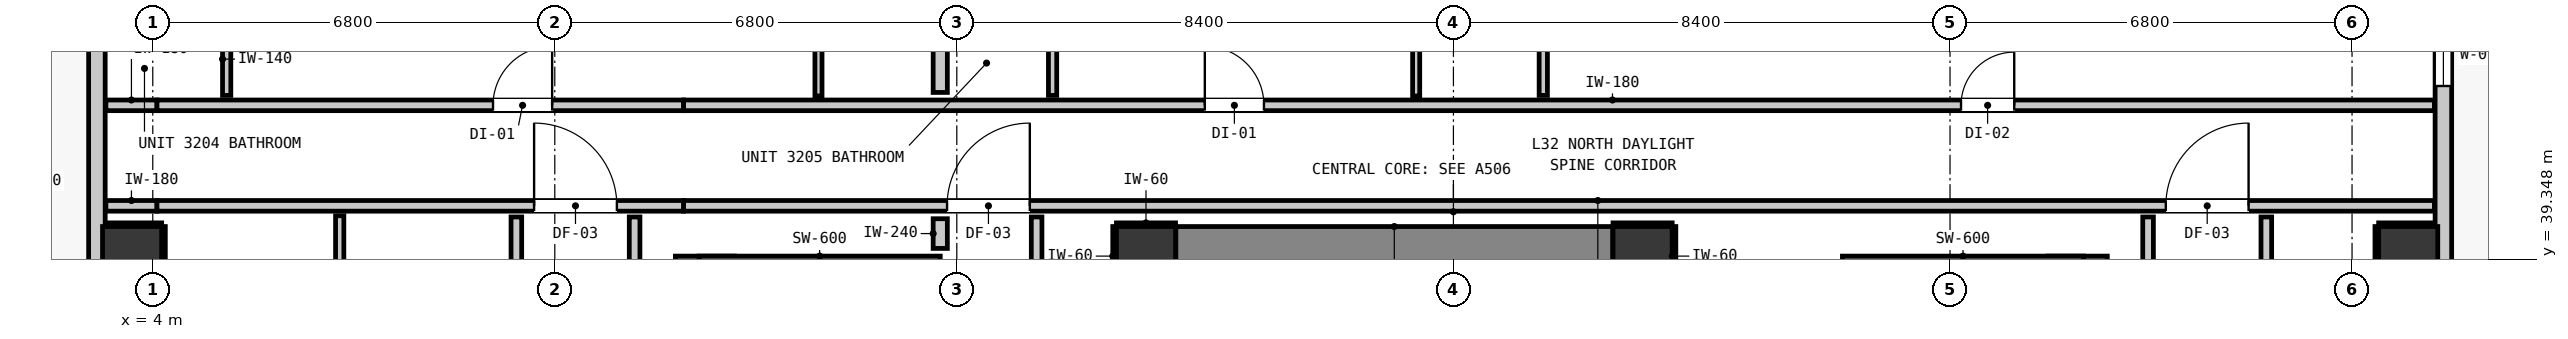
"""IFC4 building model, lengths in metres.
Left out: names, types, materials, properties, quantities, classifications, styles, units other than length and angle.
Written with IfcOpenShell. Run it as: python <this file> out.ifc"""

import sys

from ifc_helpers import new_model, si_unit, direction, frame, frame_2d, origin, origin_2d, place, context, subcontext, project, spatial, rectangle, extrude, element, fill, save


model = new_model("IFC4")
c1 = context("Model", 3, precision=1e-05, world=origin(), true_north=direction((0.0, 1.0)))
c2 = subcontext(c1, "Body", "Model", "MODEL_VIEW")
j1 = project(units=[si_unit("LENGTHUNIT", "METRE"), si_unit("PLANEANGLEUNIT", "RADIAN")], contexts=[c1])
p1 = place(None, origin())
s1 = spatial("IfcSite", under=j1, at=p1, CompositionType="ELEMENT")
p2 = place(p1, origin())
s2 = spatial("IfcBuilding", under=s1, at=p2, CompositionType="ELEMENT")
p3 = place(p2, frame((0.0, 0.0, 112.72)))
s3 = spatial("IfcBuildingStorey", under=s2, at=p3, CompositionType="ELEMENT", Elevation=112.72)
for number, where, z_axis, x_axis in (
    (1, (20.8, 39.4, 0.0), (0.0, 0.0, 1.0), (1.0, 0.0, 0.0)),
    (2, (29.2, 39.4, 0.0), (0.0, 0.0, 1.0), (1.0, 0.0, 0.0)),
):
    element("IfcColumn", number, at=place(p3, frame(where, z_axis=z_axis, x_axis=x_axis)), inside=s3, PredefinedType="COLUMN", context=c2, shape_type="SweptSolid", body=[
        extrude(rectangle(XDim=1.0, YDim=1.0, at=origin_2d()), origin(), (0.0, 0.0, 1.0), 3.32),
    ])
p4 = place(p3, frame((13.34, 31.205, 0.0), z_axis=(0.0, 0.0, 1.0), x_axis=(0.0, 1.0, 0.0)))
e3 = element("IfcWall", 3, at=p4, inside=s3, PredefinedType="SHEAR", context=c2, shape_type="SweptSolid", body=[
    extrude(rectangle(XDim=8.195, YDim=1.0, at=frame_2d((4.097, 0.0))), origin(), (0.0, 0.0, 1.0), 3.32),
])
p5 = place(p3, frame((13.24, 39.1, 0.0), z_axis=(0.0, 0.0, 1.0), x_axis=(1.0, 0.0, 0.0)))
e4 = element("IfcWall", 4, at=p5, inside=s3, PredefinedType="SHEAR", context=c2, shape_type="SweptSolid", body=[
    extrude(rectangle(XDim=4.08, YDim=0.6, at=frame_2d((2.04, 0.0))), origin(), (0.0, 0.0, 1.0), 3.32),
])
p6 = place(p3, frame((36.56, 31.205, 0.0), z_axis=(0.0, 0.0, 1.0), x_axis=(0.0, 1.0, 0.0)))
e5 = element("IfcWall", 5, at=p6, inside=s3, PredefinedType="SHEAR", context=c2, shape_type="SweptSolid", body=[
    extrude(rectangle(XDim=8.195, YDim=1.0, at=frame_2d((4.097, 0.0))), origin(), (0.0, 0.0, 1.0), 3.32),
])
p7 = place(p3, frame((32.58, 39.1, 0.0), z_axis=(0.0, 0.0, 1.0), x_axis=(1.0, 0.0, 0.0)))
e6 = element("IfcWall", 6, at=p7, inside=s3, PredefinedType="SHEAR", context=c2, shape_type="SweptSolid", body=[
    extrude(rectangle(XDim=4.08, YDim=0.6, at=frame_2d((2.04, 0.0))), origin(), (0.0, 0.0, 1.0), 3.32),
])
p8 = place(p3, frame((21.305, 39.4, 0.0), z_axis=(0.0, 0.0, 1.0), x_axis=(1.0, 0.0, 0.0)))
e7 = element("IfcWall", 7, at=p8, inside=s3, PredefinedType="SHEAR", context=c2, shape_type="SweptSolid", body=[
    extrude(rectangle(XDim=7.39, YDim=1.0, at=frame_2d((3.695, 0.0))), origin(), (0.0, 0.0, 1.0), 3.32),
])
for number, where, z_axis, x_axis in (
    (8, (3.65, 39.4, 0.0), (0.0, 0.0, 1.0), (1.0, 0.0, 0.0)),
    (9, (42.15, 39.4, 0.0), (0.0, 0.0, 1.0), (1.0, 0.0, 0.0)),
):
    element("IfcColumn", number, at=place(p3, frame(where, z_axis=z_axis, x_axis=x_axis)), inside=s3, PredefinedType="COLUMN", context=c2, shape_type="SweptSolid", body=[
        extrude(rectangle(XDim=1.0, YDim=1.0, at=origin_2d()), origin(), (0.0, 0.0, 1.0), 3.32),
    ])
p9 = place(p3, frame((3.055, 11.355, 0.0), z_axis=(0.0, 0.0, 1.0), x_axis=(0.0, 1.0, 0.0)))
e10 = element("IfcWall", 10, at=p9, inside=s3, PredefinedType="STANDARD", context=c2, shape_type="SweptSolid", body=[
    extrude(rectangle(XDim=32.29, YDim=0.28, at=frame_2d((16.145, 0.0))), origin(), (0.0, 0.0, 1.0), 3.08),
])
p10 = place(p9, frame((5.818, 0.0, 0.0)))
e11 = element("IfcOpeningElement", 11, at=p10, cuts=e10, PredefinedType="OPENING", context=c2, shape_type="SweptSolid", body=[
    extrude(rectangle(XDim=1.0, YDim=2.15, at=frame_2d((0.5, 1.075))), frame((0.0, 0.15, 0.0), z_axis=(0.0, -1.0, 0.0), x_axis=(1.0, 0.0, 0.0)), (0.0, 0.0, 1.0), 0.3),
])
p11 = place(p9, frame((0.395, 0.0, 0.85)))
e12 = element("IfcOpeningElement", 12, at=p11, cuts=e10, PredefinedType="OPENING", context=c2, shape_type="SweptSolid", body=[
    extrude(rectangle(XDim=1.35, YDim=1.85, at=frame_2d((0.675, 0.925))), frame((0.0, 0.15, 0.0), z_axis=(0.0, -1.0, 0.0), x_axis=(1.0, 0.0, 0.0)), (0.0, 0.0, 1.0), 0.3),
])
p12 = place(p9, frame((20.78, 0.0, 0.85)))
e13 = element("IfcOpeningElement", 13, at=p12, cuts=e10, PredefinedType="OPENING", context=c2, shape_type="SweptSolid", body=[
    extrude(rectangle(XDim=1.35, YDim=1.85, at=frame_2d((0.675, 0.925))), frame((0.0, 0.15, 0.0), z_axis=(0.0, -1.0, 0.0), x_axis=(1.0, 0.0, 0.0)), (0.0, 0.0, 1.0), 0.3),
])
p13 = place(p9, frame((12.61, 0.0, 0.85)))
e14 = element("IfcOpeningElement", 14, at=p13, cuts=e10, PredefinedType="OPENING", context=c2, shape_type="SweptSolid", body=[
    extrude(rectangle(XDim=1.35, YDim=1.85, at=frame_2d((0.675, 0.925))), frame((0.0, 0.15, 0.0), z_axis=(0.0, -1.0, 0.0), x_axis=(1.0, 0.0, 0.0)), (0.0, 0.0, 1.0), 0.3),
])
p14 = place(p9, frame((24.73, 0.0, 0.85)))
e15 = element("IfcOpeningElement", 15, at=p14, cuts=e10, PredefinedType="OPENING", context=c2, shape_type="SweptSolid", body=[
    extrude(rectangle(XDim=1.35, YDim=1.85, at=frame_2d((0.675, 0.925))), frame((0.0, 0.15, 0.0), z_axis=(0.0, -1.0, 0.0), x_axis=(1.0, 0.0, 0.0)), (0.0, 0.0, 1.0), 0.3),
])
p15 = place(p3, frame((42.745, 43.645, 0.0), z_axis=(0.0, 0.0, 1.0), x_axis=(0.0, -1.0, 0.0)))
e16 = element("IfcWall", 16, at=p15, inside=s3, PredefinedType="STANDARD", context=c2, shape_type="SweptSolid", body=[
    extrude(rectangle(XDim=32.29, YDim=0.28, at=frame_2d((16.145, 0.0))), origin(), (0.0, 0.0, 1.0), 3.08),
])
p16 = place(p15, frame((5.467, 0.0, 0.0)))
e17 = element("IfcOpeningElement", 17, at=p16, cuts=e16, PredefinedType="OPENING", context=c2, shape_type="SweptSolid", body=[
    extrude(rectangle(XDim=1.0, YDim=2.15, at=frame_2d((0.5, 1.075))), frame((0.0, 0.15, 0.0), z_axis=(0.0, -1.0, 0.0), x_axis=(1.0, 0.0, 0.0)), (0.0, 0.0, 1.0), 0.3),
])
p17 = place(p15, frame((0.318, 0.0, 0.85)))
e18 = element("IfcOpeningElement", 18, at=p17, cuts=e16, PredefinedType="OPENING", context=c2, shape_type="SweptSolid", body=[
    extrude(rectangle(XDim=1.05, YDim=1.65, at=frame_2d((0.525, 0.825))), frame((0.0, 0.15, 0.0), z_axis=(0.0, -1.0, 0.0), x_axis=(1.0, 0.0, 0.0)), (0.0, 0.0, 1.0), 0.3),
])
p18 = place(p15, frame((14.648, 0.0, 0.85)))
e19 = element("IfcOpeningElement", 19, at=p18, cuts=e16, PredefinedType="OPENING", context=c2, shape_type="SweptSolid", body=[
    extrude(rectangle(XDim=1.35, YDim=1.85, at=frame_2d((0.675, 0.925))), frame((0.0, 0.15, 0.0), z_axis=(0.0, -1.0, 0.0), x_axis=(1.0, 0.0, 0.0)), (0.0, 0.0, 1.0), 0.3),
])
p19 = place(p3, frame((3.207, 40.25, 0.0), z_axis=(0.0, 0.0, 1.0), x_axis=(1.0, 0.0, 0.0)))
e20 = element("IfcWall", 20, at=p19, inside=s3, PredefinedType="PARTITIONING", context=c2, shape_type="SweptSolid", body=[
    extrude(rectangle(XDim=0.864, YDim=0.18, at=frame_2d((0.432, 0.0))), origin(), (0.0, 0.0, 1.0), 3.08),
])
p20 = place(p3, frame((4.071, 40.25, 0.0), z_axis=(0.0, 0.0, 1.0), x_axis=(1.0, 0.0, 0.0)))
e21 = element("IfcWall", 21, at=p20, inside=s3, PredefinedType="PARTITIONING", context=c2, shape_type="SweptSolid", body=[
    extrude(rectangle(XDim=8.908, YDim=0.18, at=frame_2d((4.454, 0.0))), origin(), (0.0, 0.0, 1.0), 2.565),
])
p21 = place(p20, frame((6.379, 0.0, 0.0)))
e22 = element("IfcOpeningElement", 22, at=p21, cuts=e21, PredefinedType="OPENING", context=c2, shape_type="SweptSolid", body=[
    extrude(rectangle(XDim=1.4, YDim=2.15, at=frame_2d((0.7, 1.075))), frame((0.0, 0.1, 0.0), z_axis=(0.0, -1.0, 0.0), x_axis=(1.0, 0.0, 0.0)), (0.0, 0.0, 1.0), 0.2),
])
p22 = place(p3, frame((12.979, 40.25, 0.0), z_axis=(0.0, 0.0, 1.0), x_axis=(1.0, 0.0, 0.0)))
e23 = element("IfcWall", 23, at=p22, inside=s3, PredefinedType="PARTITIONING", context=c2, shape_type="SweptSolid", body=[
    extrude(rectangle(XDim=29.614, YDim=0.18, at=frame_2d((14.807, 0.0))), origin(), (0.0, 0.0, 1.0), 3.08),
])
p23 = place(p22, frame((4.456, 0.0, 0.0)))
e24 = element("IfcOpeningElement", 24, at=p23, cuts=e23, PredefinedType="OPENING", context=c2, shape_type="SweptSolid", body=[
    extrude(rectangle(XDim=1.4, YDim=2.15, at=frame_2d((0.7, 1.075))), frame((0.0, 0.1, 0.0), z_axis=(0.0, -1.0, 0.0), x_axis=(1.0, 0.0, 0.0)), (0.0, 0.0, 1.0), 0.2),
])
p24 = place(p22, frame((25.071, 0.0, 0.0)))
e25 = element("IfcOpeningElement", 25, at=p24, cuts=e23, PredefinedType="OPENING", context=c2, shape_type="SweptSolid", body=[
    extrude(rectangle(XDim=1.4, YDim=2.15, at=frame_2d((0.7, 1.075))), frame((0.0, 0.1, 0.0), z_axis=(0.0, -1.0, 0.0), x_axis=(1.0, 0.0, 0.0)), (0.0, 0.0, 1.0), 0.2),
])
p25 = place(p3, frame((3.207, 41.95, 0.0), z_axis=(0.0, 0.0, 1.0), x_axis=(1.0, 0.0, 0.0)))
e26 = element("IfcWall", 26, at=p25, inside=s3, PredefinedType="PARTITIONING", context=c2, shape_type="SweptSolid", body=[
    extrude(rectangle(XDim=0.864, YDim=0.18, at=frame_2d((0.432, 0.0))), origin(), (0.0, 0.0, 1.0), 3.08),
])
p26 = place(p3, frame((4.071, 41.95, 0.0), z_axis=(0.0, 0.0, 1.0), x_axis=(1.0, 0.0, 0.0)))
e27 = element("IfcWall", 27, at=p26, inside=s3, PredefinedType="PARTITIONING", context=c2, shape_type="SweptSolid", body=[
    extrude(rectangle(XDim=8.908, YDim=0.18, at=frame_2d((4.454, 0.0))), origin(), (0.0, 0.0, 1.0), 2.565),
])
p27 = place(p26, frame((5.684, 0.0, 0.0)))
e28 = element("IfcOpeningElement", 28, at=p27, cuts=e27, PredefinedType="OPENING", context=c2, shape_type="SweptSolid", body=[
    extrude(rectangle(XDim=1.0, YDim=2.15, at=frame_2d((0.5, 1.075))), frame((0.0, 0.1, 0.0), z_axis=(0.0, -1.0, 0.0), x_axis=(1.0, 0.0, 0.0)), (0.0, 0.0, 1.0), 0.2),
])
p28 = place(p3, frame((12.979, 41.95, 0.0), z_axis=(0.0, 0.0, 1.0), x_axis=(1.0, 0.0, 0.0)))
e29 = element("IfcWall", 29, at=p28, inside=s3, PredefinedType="PARTITIONING", context=c2, shape_type="SweptSolid", body=[
    extrude(rectangle(XDim=29.614, YDim=0.18, at=frame_2d((14.807, 0.0))), origin(), (0.0, 0.0, 1.0), 3.08),
])
p29 = place(p28, frame((8.816, 0.0, 0.0)))
e30 = element("IfcOpeningElement", 30, at=p29, cuts=e29, PredefinedType="OPENING", context=c2, shape_type="SweptSolid", body=[
    extrude(rectangle(XDim=1.0, YDim=2.15, at=frame_2d((0.5, 1.075))), frame((0.0, 0.1, 0.0), z_axis=(0.0, -1.0, 0.0), x_axis=(1.0, 0.0, 0.0)), (0.0, 0.0, 1.0), 0.2),
])
p30 = place(p28, frame((21.607, 0.0, 0.0)))
e31 = element("IfcOpeningElement", 31, at=p30, cuts=e29, PredefinedType="OPENING", context=c2, shape_type="SweptSolid", body=[
    extrude(rectangle(XDim=0.9, YDim=2.1, at=frame_2d((0.45, 1.05))), frame((0.0, 0.1, 0.0), z_axis=(0.0, -1.0, 0.0), x_axis=(1.0, 0.0, 0.0)), (0.0, 0.0, 1.0), 0.2),
])
p31 = place(p3, frame((17.32, 39.53, 0.0), z_axis=(0.0, 0.0, 1.0), x_axis=(0.0, 1.0, 0.0)))
e32 = element("IfcWall", 32, at=p31, inside=s3, PredefinedType="PARTITIONING", context=c2, shape_type="SweptSolid", body=[
    extrude(rectangle(XDim=0.502, YDim=0.24, at=frame_2d((0.251, 0.0))), origin(), (0.0, 0.0, 1.0), 3.08),
])
p32 = place(p3, frame((17.32, 42.168, 0.0), z_axis=(0.0, 0.0, 1.0), x_axis=(0.0, 1.0, 0.0)))
e33 = element("IfcWall", 33, at=p32, inside=s3, PredefinedType="PARTITIONING", context=c2, shape_type="SweptSolid", body=[
    extrude(rectangle(XDim=3.625, YDim=0.24, at=frame_2d((1.812, 0.0))), origin(), (0.0, 0.0, 1.0), 3.08),
])
p33 = place(p3, frame((10.15, 34.688, 0.0), z_axis=(0.0, 0.0, 1.0), x_axis=(0.0, 1.0, 0.0)))
e34 = element("IfcWall", 34, at=p33, inside=s3, PredefinedType="PARTITIONING", context=c2, shape_type="SweptSolid", body=[
    extrude(rectangle(XDim=5.374, YDim=0.18, at=frame_2d((2.687, 0.0))), origin(), (0.0, 0.0, 1.0), 3.08),
])
p34 = place(p3, frame((12.15, 21.368, 0.0), z_axis=(0.0, 0.0, 1.0), x_axis=(0.0, 1.0, 0.0)))
e35 = element("IfcWall", 35, at=p34, inside=s3, PredefinedType="PARTITIONING", context=c2, shape_type="SweptSolid", body=[
    extrude(rectangle(XDim=18.694, YDim=0.18, at=frame_2d((9.347, 0.0))), origin(), (0.0, 0.0, 1.0), 3.08),
])
p35 = place(p3, frame((18.95, 39.058, 0.0), z_axis=(0.0, 0.0, 1.0), x_axis=(0.0, 1.0, 0.0)))
e36 = element("IfcWall", 36, at=p35, inside=s3, PredefinedType="PARTITIONING", context=c2, shape_type="SweptSolid", body=[
    extrude(rectangle(XDim=1.004, YDim=0.18, at=frame_2d((0.502, 0.0))), origin(), (0.0, 0.0, 1.0), 3.08),
])
p36 = place(p3, frame((37.75, 21.368, 0.0), z_axis=(0.0, 0.0, 1.0), x_axis=(0.0, 1.0, 0.0)))
e37 = element("IfcWall", 37, at=p36, inside=s3, PredefinedType="PARTITIONING", context=c2, shape_type="SweptSolid", body=[
    extrude(rectangle(XDim=18.694, YDim=0.18, at=frame_2d((9.347, 0.0))), origin(), (0.0, 0.0, 1.0), 3.08),
])
p37 = place(p3, frame((39.75, 35.05, 0.0), z_axis=(0.0, 0.0, 1.0), x_axis=(0.0, 1.0, 0.0)))
e38 = element("IfcWall", 38, at=p37, inside=s3, PredefinedType="PARTITIONING", context=c2, shape_type="SweptSolid", body=[
    extrude(rectangle(XDim=5.012, YDim=0.18, at=frame_2d((2.506, 0.0))), origin(), (0.0, 0.0, 1.0), 3.08),
])
p38 = place(p3, frame((5.25, 42.118, 0.0), z_axis=(0.0, 0.0, 1.0), x_axis=(0.0, 1.0, 0.0)))
e39 = element("IfcWall", 39, at=p38, inside=s3, PredefinedType="PARTITIONING", context=c2, shape_type="SweptSolid", body=[
    extrude(rectangle(XDim=3.507, YDim=0.14, at=frame_2d((1.753, 0.0))), origin(), (0.0, 0.0, 1.0), 3.08),
])
p39 = place(p38, frame((1.327, 0.0, 0.0)))
e40 = element("IfcOpeningElement", 40, at=p39, cuts=e39, PredefinedType="OPENING", context=c2, shape_type="SweptSolid", body=[
    extrude(rectangle(XDim=0.86, YDim=2.02, at=frame_2d((0.43, 1.01))), frame((0.0, 0.08, 0.0), z_axis=(0.0, -1.0, 0.0), x_axis=(1.0, 0.0, 0.0)), (0.0, 0.0, 1.0), 0.16),
])
p40 = place(p3, frame((7.162, 34.668, 0.0), z_axis=(0.0, 0.0, 1.0), x_axis=(0.0, 1.0, 0.0)))
e41 = element("IfcWall", 41, at=p40, inside=s3, PredefinedType="PARTITIONING", context=c2, shape_type="SweptSolid", body=[
    extrude(rectangle(XDim=5.414, YDim=0.14, at=frame_2d((2.707, 0.0))), origin(), (0.0, 0.0, 1.0), 3.08),
])
p41 = place(p3, frame((19.22, 42.118, 0.0), z_axis=(0.0, 0.0, 1.0), x_axis=(0.0, 1.0, 0.0)))
e42 = element("IfcWall", 42, at=p41, inside=s3, PredefinedType="PARTITIONING", context=c2, shape_type="SweptSolid", body=[
    extrude(rectangle(XDim=3.675, YDim=0.14, at=frame_2d((1.837, 0.0))), origin(), (0.0, 0.0, 1.0), 3.08),
])
p42 = place(p41, frame((1.327, 0.0, 0.0)))
e43 = element("IfcOpeningElement", 43, at=p42, cuts=e42, PredefinedType="OPENING", context=c2, shape_type="SweptSolid", body=[
    extrude(rectangle(XDim=0.86, YDim=2.02, at=frame_2d((0.43, 1.01))), frame((0.0, 0.08, 0.0), z_axis=(0.0, -1.0, 0.0), x_axis=(1.0, 0.0, 0.0)), (0.0, 0.0, 1.0), 0.16),
])
p43 = place(p3, frame((27.52, 42.118, 0.0), z_axis=(0.0, 0.0, 1.0), x_axis=(0.0, 1.0, 0.0)))
e44 = element("IfcWall", 44, at=p43, inside=s3, PredefinedType="PARTITIONING", context=c2, shape_type="SweptSolid", body=[
    extrude(rectangle(XDim=3.675, YDim=0.14, at=frame_2d((1.837, 0.0))), origin(), (0.0, 0.0, 1.0), 3.08),
])
p44 = place(p3, frame((15.26, 42.108, 0.0), z_axis=(0.0, 0.0, 1.0), x_axis=(0.0, 1.0, 0.0)))
e45 = element("IfcWall", 45, at=p44, inside=s3, PredefinedType="PARTITIONING", context=c2, shape_type="SweptSolid", body=[
    extrude(rectangle(XDim=3.685, YDim=0.12, at=frame_2d((1.843, 0.0))), origin(), (0.0, 0.0, 1.0), 3.08),
])
p45 = place(p44, frame((1.317, 0.0, 0.0)))
e46 = element("IfcOpeningElement", 46, at=p45, cuts=e45, PredefinedType="OPENING", context=c2, shape_type="SweptSolid", body=[
    extrude(rectangle(XDim=0.9, YDim=2.1, at=frame_2d((0.45, 1.05))), frame((0.0, 0.07, 0.0), z_axis=(0.0, -1.0, 0.0), x_axis=(1.0, 0.0, 0.0)), (0.0, 0.0, 1.0), 0.14),
])
p46 = place(p3, frame((25.37, 42.108, 0.0), z_axis=(0.0, 0.0, 1.0), x_axis=(0.0, 1.0, 0.0)))
e47 = element("IfcWall", 47, at=p46, inside=s3, PredefinedType="PARTITIONING", context=c2, shape_type="SweptSolid", body=[
    extrude(rectangle(XDim=3.685, YDim=0.12, at=frame_2d((1.843, 0.0))), origin(), (0.0, 0.0, 1.0), 3.08),
])
p47 = place(p46, frame((1.317, 0.0, 0.0)))
e48 = element("IfcOpeningElement", 48, at=p47, cuts=e47, PredefinedType="OPENING", context=c2, shape_type="SweptSolid", body=[
    extrude(rectangle(XDim=0.9, YDim=2.1, at=frame_2d((0.45, 1.05))), frame((0.0, 0.07, 0.0), z_axis=(0.0, -1.0, 0.0), x_axis=(1.0, 0.0, 0.0)), (0.0, 0.0, 1.0), 0.14),
])
for number, where, z_axis, x_axis in (
    (49, (20.3, 39.932, 0.0), (0.0, 0.0, 1.0), (1.0, 0.0, 0.0)),
    (50, (20.268, 38.9, 0.0), (0.0, 0.0, 1.0), (0.0, 1.0, 0.0)),
    (51, (28.7, 39.932, 0.0), (0.0, 0.0, 1.0), (1.0, 0.0, 0.0)),
    (52, (29.732, 38.9, 0.0), (0.0, 0.0, 1.0), (0.0, 1.0, 0.0)),
):
    element("IfcWall", number, at=place(p3, frame(where, z_axis=z_axis, x_axis=x_axis)), inside=s3, PredefinedType="PARTITIONING", context=c2, shape_type="SweptSolid", body=[
        extrude(rectangle(XDim=1.0, YDim=0.06, at=frame_2d((0.5, 0.0))), origin(), (0.0, 0.0, 1.0), 1.45),
    ])
p48 = place(p3, frame((3.21, 39.932, 0.0), z_axis=(0.0, 0.0, 1.0), x_axis=(1.0, 0.0, 0.0)))
e53 = element("IfcWall", 53, at=p48, inside=s3, PredefinedType="PARTITIONING", context=c2, shape_type="SweptSolid", body=[
    extrude(rectangle(XDim=0.94, YDim=0.06, at=frame_2d((0.47, 0.0))), origin(), (0.0, 0.0, 1.0), 1.45),
])
p49 = place(p3, frame((4.182, 38.9, 0.0), z_axis=(0.0, 0.0, 1.0), x_axis=(0.0, 1.0, 0.0)))
e54 = element("IfcWall", 54, at=p49, inside=s3, PredefinedType="PARTITIONING", context=c2, shape_type="SweptSolid", body=[
    extrude(rectangle(XDim=1.0, YDim=0.06, at=frame_2d((0.5, 0.0))), origin(), (0.0, 0.0, 1.0), 1.45),
])
p50 = place(p3, frame((41.65, 39.932, 0.0), z_axis=(0.0, 0.0, 1.0), x_axis=(1.0, 0.0, 0.0)))
e55 = element("IfcWall", 55, at=p50, inside=s3, PredefinedType="PARTITIONING", context=c2, shape_type="SweptSolid", body=[
    extrude(rectangle(XDim=0.94, YDim=0.06, at=frame_2d((0.47, 0.0))), origin(), (0.0, 0.0, 1.0), 1.45),
])
p51 = place(p3, frame((41.618, 38.9, 0.0), z_axis=(0.0, 0.0, 1.0), x_axis=(0.0, 1.0, 0.0)))
e56 = element("IfcWall", 56, at=p51, inside=s3, PredefinedType="PARTITIONING", context=c2, shape_type="SweptSolid", body=[
    extrude(rectangle(XDim=1.0, YDim=0.06, at=frame_2d((0.5, 0.0))), origin(), (0.0, 0.0, 1.0), 1.45),
])
p52 = place(p17, origin())
e57 = element("IfcWindow", 57, at=p52, inside=s3, PartitioningType="SINGLE_PANEL", PredefinedType="WINDOW", context=c2, shape_type="SweptSolid", body=[
    extrude(rectangle(XDim=1.05, YDim=1.65, at=frame_2d((0.525, 0.825))), frame((0.0, 0.03, 0.0), z_axis=(0.0, -1.0, 0.0), x_axis=(1.0, 0.0, 0.0)), (0.0, 0.0, 1.0), 0.06),
])
fill(e18, e57)
p53 = place(p23, origin())
e58 = element("IfcDoor", 58, at=p53, inside=s3, OperationType="SINGLE_SWING_RIGHT", PredefinedType="DOOR", context=c2, shape_type="SweptSolid", body=[
    extrude(rectangle(XDim=1.4, YDim=2.15, at=frame_2d((0.7, 1.075))), frame((0.0, 0.025, 0.0), z_axis=(0.0, -1.0, 0.0), x_axis=(1.0, 0.0, 0.0)), (0.0, 0.0, 1.0), 0.05),
])
fill(e24, e58)
p54 = place(p21, origin())
e59 = element("IfcDoor", 59, at=p54, inside=s3, OperationType="SINGLE_SWING_LEFT", PredefinedType="DOOR", context=c2, shape_type="SweptSolid", body=[
    extrude(rectangle(XDim=1.4, YDim=2.15, at=frame_2d((0.7, 1.075))), frame((0.0, 0.025, 0.0), z_axis=(0.0, -1.0, 0.0), x_axis=(1.0, 0.0, 0.0)), (0.0, 0.0, 1.0), 0.05),
])
fill(e22, e59)
p55 = place(p24, origin())
e60 = element("IfcDoor", 60, at=p55, inside=s3, OperationType="SINGLE_SWING_RIGHT", PredefinedType="DOOR", context=c2, shape_type="SweptSolid", body=[
    extrude(rectangle(XDim=1.4, YDim=2.15, at=frame_2d((0.7, 1.075))), frame((0.0, 0.025, 0.0), z_axis=(0.0, -1.0, 0.0), x_axis=(1.0, 0.0, 0.0)), (0.0, 0.0, 1.0), 0.05),
])
fill(e25, e60)
p56 = place(p27, origin())
e61 = element("IfcDoor", 61, at=p56, inside=s3, OperationType="SINGLE_SWING_RIGHT", PredefinedType="DOOR", context=c2, shape_type="SweptSolid", body=[
    extrude(rectangle(XDim=1.0, YDim=2.15, at=frame_2d((0.5, 1.075))), frame((0.0, 0.025, 0.0), z_axis=(0.0, -1.0, 0.0), x_axis=(1.0, 0.0, 0.0)), (0.0, 0.0, 1.0), 0.05),
])
fill(e28, e61)
p57 = place(p29, origin())
e62 = element("IfcDoor", 62, at=p57, inside=s3, OperationType="SINGLE_SWING_LEFT", PredefinedType="DOOR", context=c2, shape_type="SweptSolid", body=[
    extrude(rectangle(XDim=1.0, YDim=2.15, at=frame_2d((0.5, 1.075))), frame((0.0, 0.025, 0.0), z_axis=(0.0, -1.0, 0.0), x_axis=(1.0, 0.0, 0.0)), (0.0, 0.0, 1.0), 0.05),
])
fill(e30, e62)
p58 = place(p30, origin())
e63 = element("IfcDoor", 63, at=p58, inside=s3, OperationType="SINGLE_SWING_RIGHT", PredefinedType="DOOR", context=c2, shape_type="SweptSolid", body=[
    extrude(rectangle(XDim=0.9, YDim=2.1, at=frame_2d((0.45, 1.05))), frame((0.0, 0.025, 0.0), z_axis=(0.0, -1.0, 0.0), x_axis=(1.0, 0.0, 0.0)), (0.0, 0.0, 1.0), 0.05),
])
fill(e31, e63)
save(model, sys.argv[1])
